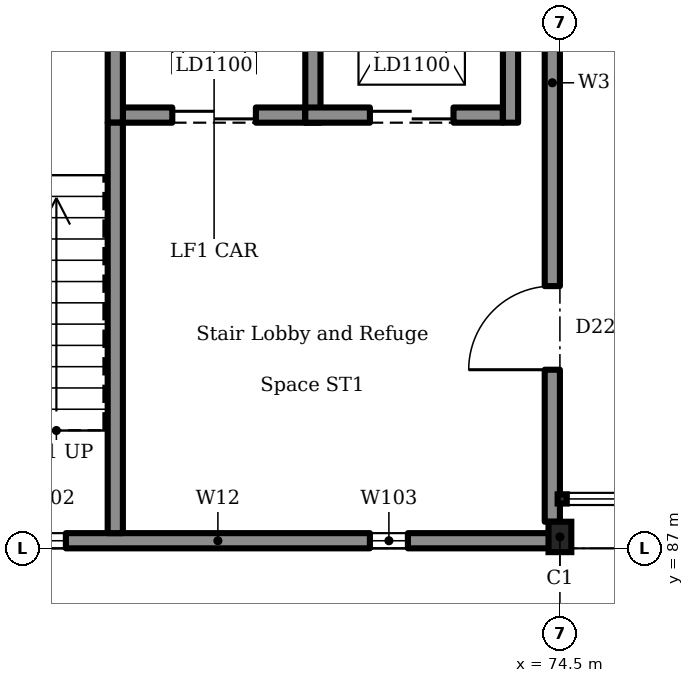
"""IFC4 building model, lengths in metres.
Left out: names, types, materials, properties, quantities, classifications, styles, units other than length and angle.
Written with IfcOpenShell. Run it as: python <this file> out.ifc"""

import sys

from ifc_helpers import new_model, si_unit, direction, frame, frame_2d, origin, origin_2d, place, context, subcontext, project, spatial, rectangle, i_section, extrude, element, fill, save


model = new_model("IFC4")
c1 = context("Model", 3, precision=1e-05, world=origin(), true_north=direction((0.0, 1.0)))
c2 = subcontext(c1, "Body", "Model", "MODEL_VIEW")
j1 = project(units=[si_unit("LENGTHUNIT", "METRE"), si_unit("PLANEANGLEUNIT", "RADIAN")], contexts=[c1])
p1 = place(None, origin())
s1 = spatial("IfcSite", under=j1, at=p1, CompositionType="ELEMENT")
p2 = place(p1, origin())
s2 = spatial("IfcBuilding", under=s1, at=p2, CompositionType="ELEMENT")
p3 = place(p2, frame((0.0, 0.0, 9.9)))
s3 = spatial("IfcBuildingStorey", under=s2, at=p3, CompositionType="ELEMENT", Elevation=9.9)
p4 = place(p3, frame((68.75, 92.7, 0.0), z_axis=(0.0, 0.0, 1.0), x_axis=(1.0, 0.0, 0.0)))
e1 = element("IfcWall", 1, at=p4, inside=s3, PredefinedType="SOLIDWALL", context=c2, shape_type="SweptSolid", body=[
    extrude(rectangle(XDim=2.4, YDim=0.2, at=frame_2d((1.2, 0.0))), origin(), (0.0, 0.0, 1.0), 4.5),
])
p5 = place(p4, frame((0.65, 0.0, 0.0)))
e2 = element("IfcOpeningElement", 2, at=p5, cuts=e1, PredefinedType="OPENING", context=c2, shape_type="SweptSolid", body=[
    extrude(rectangle(XDim=1.1, YDim=2.1, at=frame_2d((0.55, 1.05))), frame((0.0, 0.11, 0.0), z_axis=(0.0, -1.0, 0.0), x_axis=(1.0, 0.0, 0.0)), (0.0, 0.0, 1.0), 0.22),
])
for number, where, z_axis, x_axis in (
    (3, (68.65, 92.6, 0.0), (0.0, 0.0, 1.0), (0.0, 1.0, 0.0)),
    (4, (71.25, 92.6, 0.0), (0.0, 0.0, 1.0), (0.0, 1.0, 0.0)),
):
    element("IfcWall", number, at=place(p3, frame(where, z_axis=z_axis, x_axis=x_axis)), inside=s3, PredefinedType="SOLIDWALL", context=c2, shape_type="SweptSolid", body=[
        extrude(rectangle(XDim=3.4, YDim=0.2, at=frame_2d((1.7, 0.0))), origin(), (0.0, 0.0, 1.0), 4.5),
    ])
p6 = place(p3, frame((71.15, 92.7, 0.0), z_axis=(0.0, 0.0, 1.0), x_axis=(1.0, 0.0, 0.0)))
e5 = element("IfcWall", 5, at=p6, inside=s3, PredefinedType="SOLIDWALL", context=c2, shape_type="SweptSolid", body=[
    extrude(rectangle(XDim=2.6, YDim=0.2, at=frame_2d((1.3, 0.0))), origin(), (0.0, 0.0, 1.0), 4.5),
])
p7 = place(p6, frame((0.85, 0.0, 0.0)))
e6 = element("IfcOpeningElement", 6, at=p7, cuts=e5, PredefinedType="OPENING", context=c2, shape_type="SweptSolid", body=[
    extrude(rectangle(XDim=1.1, YDim=2.1, at=frame_2d((0.55, 1.05))), frame((0.0, 0.11, 0.0), z_axis=(0.0, -1.0, 0.0), x_axis=(1.0, 0.0, 0.0)), (0.0, 0.0, 1.0), 0.22),
])
p8 = place(p3, frame((73.85, 92.6, 0.0), z_axis=(0.0, 0.0, 1.0), x_axis=(0.0, 1.0, 0.0)))
e7 = element("IfcWall", 7, at=p8, inside=s3, PredefinedType="SOLIDWALL", context=c2, shape_type="SweptSolid", body=[
    extrude(rectangle(XDim=3.4, YDim=0.2, at=frame_2d((1.7, 0.0))), origin(), (0.0, 0.0, 1.0), 4.5),
])
p9 = place(p3, frame((74.5, 87.15, 0.0), z_axis=(0.0, 0.0, 1.0), x_axis=(1.0, 0.0, 0.0)))
e8 = element("IfcColumn", 8, at=p9, inside=s3, PredefinedType="COLUMN", context=c2, shape_type="SweptSolid", body=[
    extrude(i_section(OverallWidth=0.3, OverallDepth=0.4, WebThickness=0.013, FlangeThickness=0.024, FilletRadius=0.027, at=origin_2d()), origin(), (0.0, 0.0, 1.0), 4.5),
])
p10 = place(p3, frame((74.4, 87.35, 0.0), z_axis=(0.0, 0.0, 1.0), x_axis=(0.0, 1.0, 0.0)))
e9 = element("IfcWall", 9, at=p10, inside=s3, PredefinedType="SOLIDWALL", context=c2, shape_type="SweptSolid", body=[
    extrude(rectangle(XDim=8.45, YDim=0.2, at=frame_2d((4.225, 0.0))), origin(), (0.0, 0.0, 1.0), 4.35),
])
p11 = place(p10, frame((2.0, 0.0, 0.0)))
e10 = element("IfcOpeningElement", 10, at=p11, cuts=e9, PredefinedType="OPENING", context=c2, shape_type="SweptSolid", body=[
    extrude(rectangle(XDim=1.1, YDim=2.1, at=frame_2d((0.55, 1.05))), frame((0.0, 0.11, 0.0), z_axis=(0.0, -1.0, 0.0), x_axis=(1.0, 0.0, 0.0)), (0.0, 0.0, 1.0), 0.22),
])
p12 = place(p3, frame((65.511, 87.1, 0.0), z_axis=(0.0, 0.0, 1.0), x_axis=(1.0, 0.0, 0.0)))
e11 = element("IfcWall", 11, at=p12, inside=s3, PredefinedType="SOLIDWALL", context=c2, shape_type="SweptSolid", body=[
    extrude(rectangle(XDim=8.978, YDim=0.2, at=frame_2d((4.489, 0.0))), origin(), (0.0, 0.0, 1.0), 4.35),
])
p13 = place(p12, frame((1.989, 0.0, 2.9)))
e12 = element("IfcOpeningElement", 12, at=p13, cuts=e11, PredefinedType="OPENING", context=c2, shape_type="SweptSolid", body=[
    extrude(rectangle(XDim=0.5, YDim=1.2, at=frame_2d((0.25, 0.6))), frame((0.0, 0.11, 0.0), z_axis=(0.0, -1.0, 0.0), x_axis=(1.0, 0.0, 0.0)), (0.0, 0.0, 1.0), 0.22),
])
p14 = place(p12, frame((6.489, 0.0, 2.9)))
e13 = element("IfcOpeningElement", 13, at=p14, cuts=e11, PredefinedType="OPENING", context=c2, shape_type="SweptSolid", body=[
    extrude(rectangle(XDim=0.5, YDim=1.2, at=frame_2d((0.25, 0.6))), frame((0.0, 0.11, 0.0), z_axis=(0.0, -1.0, 0.0), x_axis=(1.0, 0.0, 0.0)), (0.0, 0.0, 1.0), 0.22),
])
p15 = place(p3, frame((68.65, 87.2, 0.0), z_axis=(0.0, 0.0, 1.0), x_axis=(0.0, 1.0, 0.0)))
e14 = element("IfcWall", 14, at=p15, inside=s3, PredefinedType="SOLIDWALL", context=c2, shape_type="SweptSolid", body=[
    extrude(rectangle(XDim=5.4, YDim=0.2, at=frame_2d((2.7, 0.0))), origin(), (0.0, 0.0, 1.0), 4.35),
])
p16 = place(p5, origin())
e15 = element("IfcDoor", 15, at=p16, inside=s3, OperationType="SLIDING_TO_LEFT", PredefinedType="DOOR", context=c2, shape_type="SweptSolid", body=[
    extrude(rectangle(XDim=1.1, YDim=2.1, at=frame_2d((0.55, 1.05))), frame((0.0, 0.025, 0.0), z_axis=(0.0, -1.0, 0.0), x_axis=(1.0, 0.0, 0.0)), (0.0, 0.0, 1.0), 0.05),
])
fill(e2, e15)
p17 = place(p7, origin())
e16 = element("IfcDoor", 16, at=p17, inside=s3, OperationType="SLIDING_TO_LEFT", PredefinedType="DOOR", context=c2, shape_type="SweptSolid", body=[
    extrude(rectangle(XDim=1.1, YDim=2.1, at=frame_2d((0.55, 1.05))), frame((0.0, 0.025, 0.0), z_axis=(0.0, -1.0, 0.0), x_axis=(1.0, 0.0, 0.0)), (0.0, 0.0, 1.0), 0.05),
])
fill(e6, e16)
p18 = place(p13, origin())
e17 = element("IfcWindow", 17, at=p18, inside=s3, PartitioningType="SINGLE_PANEL", PredefinedType="WINDOW", context=c2, shape_type="SweptSolid", body=[
    extrude(rectangle(XDim=0.5, YDim=1.2, at=frame_2d((0.25, 0.6))), frame((0.0, 0.03, 0.0), z_axis=(0.0, -1.0, 0.0), x_axis=(1.0, 0.0, 0.0)), (0.0, 0.0, 1.0), 0.06),
])
fill(e12, e17)
p19 = place(p14, origin())
e18 = element("IfcWindow", 18, at=p19, inside=s3, PartitioningType="SINGLE_PANEL", PredefinedType="WINDOW", context=c2, shape_type="SweptSolid", body=[
    extrude(rectangle(XDim=0.5, YDim=1.2, at=frame_2d((0.25, 0.6))), frame((0.0, 0.03, 0.0), z_axis=(0.0, -1.0, 0.0), x_axis=(1.0, 0.0, 0.0)), (0.0, 0.0, 1.0), 0.06),
])
fill(e13, e18)
p20 = place(p11, origin())
e19 = element("IfcDoor", 19, at=p20, inside=s3, OperationType="SINGLE_SWING_RIGHT", PredefinedType="DOOR", context=c2, shape_type="SweptSolid", body=[
    extrude(rectangle(XDim=1.1, YDim=2.1, at=frame_2d((0.55, 1.05))), frame((0.0, 0.025, 0.0), z_axis=(0.0, -1.0, 0.0), x_axis=(1.0, 0.0, 0.0)), (0.0, 0.0, 1.0), 0.05),
])
fill(e10, e19)
save(model, sys.argv[1])
